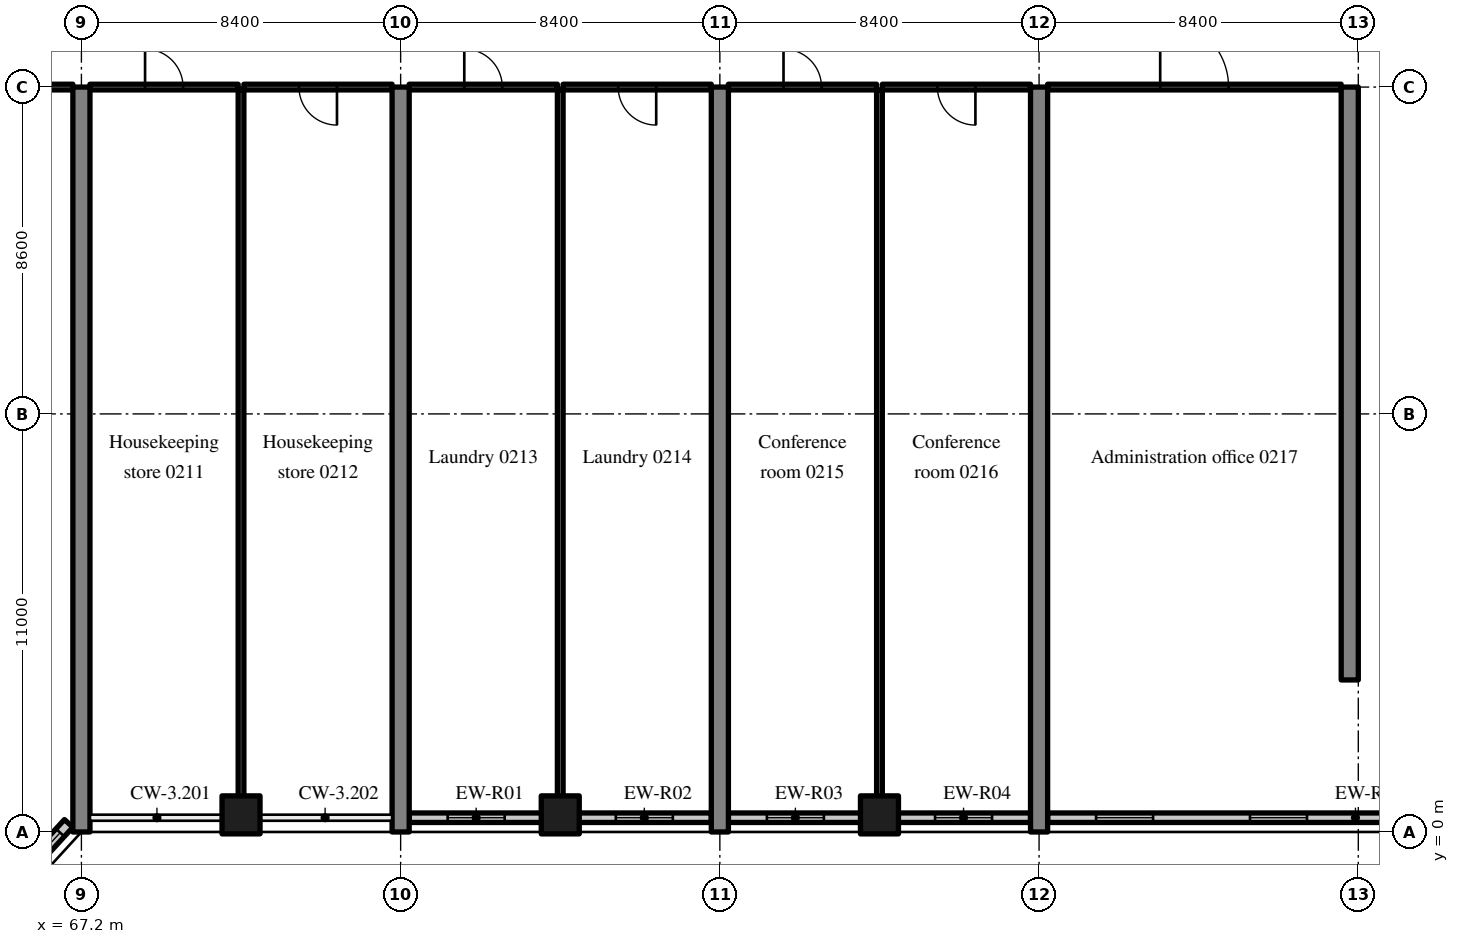
"""IFC4 building model, lengths in metres.
Left out: names, types, materials, properties, quantities, classifications, styles, units other than length and angle.
Written with IfcOpenShell. Run it as: python <this file> out.ifc"""

import sys

from ifc_helpers import new_model, si_unit, direction, frame, frame_2d, origin, origin_2d, place, context, subcontext, project, spatial, rectangle, extrude, source, transform, mapped, element, fill, save


model = new_model("IFC4")
c1 = context("Model", 3, precision=1e-05, world=origin(), true_north=direction((0.0, 1.0)))
c2 = subcontext(c1, "Body", "Model", "MODEL_VIEW")
j1 = project(units=[si_unit("LENGTHUNIT", "METRE"), si_unit("PLANEANGLEUNIT", "RADIAN")], contexts=[c1])
p1 = place(None, origin())
s1 = spatial("IfcSite", under=j1, at=p1, CompositionType="ELEMENT")
p2 = place(p1, origin())
s2 = spatial("IfcBuilding", under=s1, at=p2, CompositionType="ELEMENT")
p3 = place(p2, frame((0.0, 0.0, 11.4)))
s3 = spatial("IfcBuildingStorey", under=s2, at=p3, CompositionType="ELEMENT", Elevation=11.4)
m1 = source(origin(), c2, "Body", "SweptSolid", [
    extrude(rectangle(XDim=19.6, YDim=0.45, at=frame_2d((9.8, 0.0))), origin(), (0.0, 0.0, 1.0), 6.32),
])
for number, where, z_axis, x_axis in (
    (1, (67.2, 0.0, 0.0), (0.0, 0.0, 1.0), (0.0, 1.0, 0.0)),
    (2, (75.6, 0.0, 0.0), (0.0, 0.0, 1.0), (0.0, 1.0, 0.0)),
    (3, (84.0, 0.0, 0.0), (0.0, 0.0, 1.0), (0.0, 1.0, 0.0)),
    (4, (92.4, 0.0, 0.0), (0.0, 0.0, 1.0), (0.0, 1.0, 0.0)),
):
    element("IfcWall", number, at=place(p3, frame(where, z_axis=z_axis, x_axis=x_axis)), inside=s3, PredefinedType="SHEAR", context=c2, shape_type="MappedRepresentation", body=[
        mapped(m1, transform((0.0, 0.0, 0.0), scale=1.0)),
    ])
m2 = source(origin(), c2, "Body", "SweptSolid", [
    extrude(rectangle(XDim=15.6, YDim=0.45, at=frame_2d((7.8, 0.0))), origin(), (0.0, 0.0, 1.0), 6.32),
])
p4 = place(p3, frame((100.575, 4.0, 0.0), z_axis=(0.0, 0.0, 1.0), x_axis=(0.0, 1.0, 0.0)))
e5 = element("IfcWall", 5, at=p4, inside=s3, PredefinedType="SHEAR", context=c2, shape_type="MappedRepresentation", body=[
    mapped(m2, transform((0.0, 0.0, 0.0), scale=1.0)),
])
m3 = source(origin(), c2, "Body", "SweptSolid", [
    extrude(rectangle(XDim=1.0, YDim=1.0, at=origin_2d()), origin(), (0.0, 0.0, 1.0), 6.32),
])
for number, where, z_axis, x_axis in (
    (6, (71.4, 0.45, 0.0), (0.0, 0.0, 1.0), (1.0, 0.0, 0.0)),
    (7, (79.8, 0.45, 0.0), (0.0, 0.0, 1.0), (1.0, 0.0, 0.0)),
    (8, (88.2, 0.45, 0.0), (0.0, 0.0, 1.0), (1.0, 0.0, 0.0)),
):
    element("IfcColumn", number, at=place(p3, frame(where, z_axis=z_axis, x_axis=x_axis)), inside=s3, PredefinedType="COLUMN", context=c2, shape_type="MappedRepresentation", body=[
        mapped(m3, transform((0.0, 0.0, 0.0), scale=1.0)),
    ])
m4 = source(origin(), c2, "Body", "SweptSolid", [
    extrude(rectangle(XDim=2.162, YDim=0.3, at=frame_2d((1.081, 0.0))), origin(), (0.0, 0.0, 1.0), 6.32),
])
p5 = place(p3, frame((65.404, -1.369, 0.0), z_axis=(0.0, 0.0, 1.0), x_axis=(0.67537173084, 0.737477474355, 0.0)))
e9 = element("IfcWall", 9, at=p5, inside=s3, PredefinedType="SOLIDWALL", context=c2, shape_type="MappedRepresentation", body=[
    mapped(m4, transform((0.0, 0.0, 0.0), scale=1.0)),
])
m5 = source(origin(), c2, "Body", "SweptSolid", [
    extrude(rectangle(XDim=1.5, YDim=2.0, at=frame_2d((0.75, 1.0))), frame((0.0, 0.16, 0.0), z_axis=(0.0, -1.0, 0.0), x_axis=(1.0, 0.0, 0.0)), (0.0, 0.0, 1.0), 0.32),
])
p6 = place(p5, frame((0.331, 0.0, 0.9)))
e10 = element("IfcOpeningElement", 10, at=p6, cuts=e9, PredefinedType="OPENING", context=c2, shape_type="MappedRepresentation", body=[
    mapped(m5, transform((0.0, 0.0, 0.0), scale=1.0)),
])
m6 = source(origin(), c2, "Body", "SweptSolid", [
    extrude(rectangle(XDim=3.525, YDim=0.25, at=frame_2d((1.763, 0.0))), origin(), (0.0, 0.0, 1.0), 5.57),
])
p7 = place(p3, frame((75.825, 0.375, 0.0), z_axis=(0.0, 0.0, 1.0), x_axis=(1.0, 0.0, 0.0)))
e11 = element("IfcWall", 11, at=p7, inside=s3, PredefinedType="SOLIDWALL", context=c2, shape_type="MappedRepresentation", body=[
    mapped(m6, transform((0.0, 0.0, 0.0), scale=1.0)),
])
m7 = source(origin(), c2, "Body", "SweptSolid", [
    extrude(rectangle(XDim=1.5, YDim=2.0, at=frame_2d((0.75, 1.0))), frame((0.0, 0.135, 0.0), z_axis=(0.0, -1.0, 0.0), x_axis=(1.0, 0.0, 0.0)), (0.0, 0.0, 1.0), 0.27),
])
p8 = place(p7, frame((1.012, 0.0, 0.9)))
e12 = element("IfcOpeningElement", 12, at=p8, cuts=e11, PredefinedType="OPENING", context=c2, shape_type="MappedRepresentation", body=[
    mapped(m7, transform((0.0, 0.0, 0.0), scale=1.0)),
])
m8 = source(origin(), c2, "Body", "SweptSolid", [
    extrude(rectangle(XDim=3.525, YDim=0.25, at=frame_2d((1.762, 0.0))), origin(), (0.0, 0.0, 1.0), 5.57),
])
p9 = place(p3, frame((80.25, 0.375, 0.0), z_axis=(0.0, 0.0, 1.0), x_axis=(1.0, 0.0, 0.0)))
e13 = element("IfcWall", 13, at=p9, inside=s3, PredefinedType="SOLIDWALL", context=c2, shape_type="MappedRepresentation", body=[
    mapped(m8, transform((0.0, 0.0, 0.0), scale=1.0)),
])
p10 = place(p9, frame((1.012, 0.0, 0.9)))
e14 = element("IfcOpeningElement", 14, at=p10, cuts=e13, PredefinedType="OPENING", context=c2, shape_type="MappedRepresentation", body=[
    mapped(m7, transform((0.0, 0.0, 0.0), scale=1.0)),
])
p11 = place(p3, frame((84.225, 0.375, 0.0), z_axis=(0.0, 0.0, 1.0), x_axis=(1.0, 0.0, 0.0)))
e15 = element("IfcWall", 15, at=p11, inside=s3, PredefinedType="SOLIDWALL", context=c2, shape_type="MappedRepresentation", body=[
    mapped(m8, transform((0.0, 0.0, 0.0), scale=1.0)),
])
p12 = place(p11, frame((1.012, 0.0, 0.9)))
e16 = element("IfcOpeningElement", 16, at=p12, cuts=e15, PredefinedType="OPENING", context=c2, shape_type="MappedRepresentation", body=[
    mapped(m7, transform((0.0, 0.0, 0.0), scale=1.0)),
])
p13 = place(p3, frame((88.65, 0.375, 0.0), z_axis=(0.0, 0.0, 1.0), x_axis=(1.0, 0.0, 0.0)))
e17 = element("IfcWall", 17, at=p13, inside=s3, PredefinedType="SOLIDWALL", context=c2, shape_type="MappedRepresentation", body=[
    mapped(m6, transform((0.0, 0.0, 0.0), scale=1.0)),
])
p14 = place(p13, frame((1.012, 0.0, 0.9)))
e18 = element("IfcOpeningElement", 18, at=p14, cuts=e17, PredefinedType="OPENING", context=c2, shape_type="MappedRepresentation", body=[
    mapped(m7, transform((0.0, 0.0, 0.0), scale=1.0)),
])
m9 = source(origin(), c2, "Body", "SweptSolid", [
    extrude(rectangle(XDim=16.2, YDim=0.25, at=frame_2d((8.1, 0.0))), origin(), (0.0, 0.0, 1.0), 5.57),
])
p15 = place(p3, frame((92.625, 0.375, 0.0), z_axis=(0.0, 0.0, 1.0), x_axis=(1.0, 0.0, 0.0)))
e19 = element("IfcWall", 19, at=p15, inside=s3, PredefinedType="SOLIDWALL", context=c2, shape_type="MappedRepresentation", body=[
    mapped(m9, transform((0.0, 0.0, 0.0), scale=1.0)),
])
p16 = place(p15, frame((1.275, 0.0, 0.9)))
e20 = element("IfcOpeningElement", 20, at=p16, cuts=e19, PredefinedType="OPENING", context=c2, shape_type="MappedRepresentation", body=[
    mapped(m7, transform((0.0, 0.0, 0.0), scale=1.0)),
])
p17 = place(p15, frame((5.325, 0.0, 0.9)))
e21 = element("IfcOpeningElement", 21, at=p17, cuts=e19, PredefinedType="OPENING", context=c2, shape_type="MappedRepresentation", body=[
    mapped(m7, transform((0.0, 0.0, 0.0), scale=1.0)),
])
p18 = place(p15, frame((9.375, 0.0, 0.9)))
e22 = element("IfcOpeningElement", 22, at=p18, cuts=e19, PredefinedType="OPENING", context=c2, shape_type="MappedRepresentation", body=[
    mapped(m7, transform((0.0, 0.0, 0.0), scale=1.0)),
])
p19 = place(p15, frame((13.425, 0.0, 0.9)))
e23 = element("IfcOpeningElement", 23, at=p19, cuts=e19, PredefinedType="OPENING", context=c2, shape_type="MappedRepresentation", body=[
    mapped(m7, transform((0.0, 0.0, 0.0), scale=1.0)),
])
m10 = source(origin(), c2, "Body", "SweptSolid", [
    extrude(rectangle(XDim=7.95, YDim=0.15, at=frame_2d((3.975, 0.0))), origin(), (0.0, 0.0, 1.0), 5.62),
])
p20 = place(p3, frame((59.025, 19.6, 0.0), z_axis=(0.0, 0.0, 1.0), x_axis=(1.0, 0.0, 0.0)))
e24 = element("IfcWall", 24, at=p20, inside=s3, PredefinedType="PARTITIONING", context=c2, shape_type="MappedRepresentation", body=[
    mapped(m10, transform((0.0, 0.0, 0.0), scale=1.0)),
])
m11 = source(origin(), c2, "Body", "SweptSolid", [
    extrude(rectangle(XDim=1.8, YDim=2.1, at=frame_2d((0.9, 1.05))), frame((0.0, 0.085, 0.0), z_axis=(0.0, -1.0, 0.0), x_axis=(1.0, 0.0, 0.0)), (0.0, 0.0, 1.0), 0.17),
])
p21 = place(p20, frame((3.075, 0.0, 0.0)))
e25 = element("IfcOpeningElement", 25, at=p21, cuts=e24, PredefinedType="OPENING", context=c2, shape_type="MappedRepresentation", body=[
    mapped(m11, transform((0.0, 0.0, 0.0), scale=1.0)),
])
m12 = source(origin(), c2, "Body", "SweptSolid", [
    extrude(rectangle(XDim=3.9, YDim=0.15, at=frame_2d((1.95, 0.0))), origin(), (0.0, 0.0, 1.0), 5.62),
])
p22 = place(p3, frame((67.425, 19.6, 0.0), z_axis=(0.0, 0.0, 1.0), x_axis=(1.0, 0.0, 0.0)))
e26 = element("IfcWall", 26, at=p22, inside=s3, PredefinedType="PARTITIONING", context=c2, shape_type="MappedRepresentation", body=[
    mapped(m12, transform((0.0, 0.0, 0.0), scale=1.0)),
])
m13 = source(origin(), c2, "Body", "SweptSolid", [
    extrude(rectangle(XDim=1.0, YDim=2.1, at=frame_2d((0.5, 1.05))), frame((0.0, 0.085, 0.0), z_axis=(0.0, -1.0, 0.0), x_axis=(1.0, 0.0, 0.0)), (0.0, 0.0, 1.0), 0.17),
])
p23 = place(p22, frame((1.45, 0.0, 0.0)))
e27 = element("IfcOpeningElement", 27, at=p23, cuts=e26, PredefinedType="OPENING", context=c2, shape_type="MappedRepresentation", body=[
    mapped(m13, transform((0.0, 0.0, 0.0), scale=1.0)),
])
p24 = place(p3, frame((71.475, 19.6, 0.0), z_axis=(0.0, 0.0, 1.0), x_axis=(1.0, 0.0, 0.0)))
e28 = element("IfcWall", 28, at=p24, inside=s3, PredefinedType="PARTITIONING", context=c2, shape_type="MappedRepresentation", body=[
    mapped(m12, transform((0.0, 0.0, 0.0), scale=1.0)),
])
p25 = place(p24, frame((1.45, 0.0, 0.0)))
e29 = element("IfcOpeningElement", 29, at=p25, cuts=e28, PredefinedType="OPENING", context=c2, shape_type="MappedRepresentation", body=[
    mapped(m13, transform((0.0, 0.0, 0.0), scale=1.0)),
])
m14 = source(origin(), c2, "Body", "SweptSolid", [
    extrude(rectangle(XDim=18.625, YDim=0.15, at=frame_2d((9.312, 0.0))), origin(), (0.0, 0.0, 1.0), 6.32),
])
p26 = place(p3, frame((71.4, 0.9, 0.0), z_axis=(0.0, 0.0, 1.0), x_axis=(0.0, 1.0, 0.0)))
e30 = element("IfcWall", 30, at=p26, inside=s3, PredefinedType="PARTITIONING", context=c2, shape_type="MappedRepresentation", body=[
    mapped(m14, transform((0.0, 0.0, 0.0), scale=1.0)),
])
m15 = source(origin(), c2, "Body", "SweptSolid", [
    extrude(rectangle(XDim=3.9, YDim=0.15, at=frame_2d((1.95, 0.0))), origin(), (0.0, 0.0, 1.0), 5.62),
])
p27 = place(p3, frame((75.825, 19.6, 0.0), z_axis=(0.0, 0.0, 1.0), x_axis=(1.0, 0.0, 0.0)))
e31 = element("IfcWall", 31, at=p27, inside=s3, PredefinedType="PARTITIONING", context=c2, shape_type="MappedRepresentation", body=[
    mapped(m15, transform((0.0, 0.0, 0.0), scale=1.0)),
])
p28 = place(p27, frame((1.45, 0.0, 0.0)))
e32 = element("IfcOpeningElement", 32, at=p28, cuts=e31, PredefinedType="OPENING", context=c2, shape_type="MappedRepresentation", body=[
    mapped(m13, transform((0.0, 0.0, 0.0), scale=1.0)),
])
p29 = place(p3, frame((79.875, 19.6, 0.0), z_axis=(0.0, 0.0, 1.0), x_axis=(1.0, 0.0, 0.0)))
e33 = element("IfcWall", 33, at=p29, inside=s3, PredefinedType="PARTITIONING", context=c2, shape_type="MappedRepresentation", body=[
    mapped(m12, transform((0.0, 0.0, 0.0), scale=1.0)),
])
p30 = place(p29, frame((1.45, 0.0, 0.0)))
e34 = element("IfcOpeningElement", 34, at=p30, cuts=e33, PredefinedType="OPENING", context=c2, shape_type="MappedRepresentation", body=[
    mapped(m13, transform((0.0, 0.0, 0.0), scale=1.0)),
])
p31 = place(p3, frame((79.8, 0.9, 0.0), z_axis=(0.0, 0.0, 1.0), x_axis=(0.0, 1.0, 0.0)))
e35 = element("IfcWall", 35, at=p31, inside=s3, PredefinedType="PARTITIONING", context=c2, shape_type="MappedRepresentation", body=[
    mapped(m14, transform((0.0, 0.0, 0.0), scale=1.0)),
])
p32 = place(p3, frame((84.225, 19.6, 0.0), z_axis=(0.0, 0.0, 1.0), x_axis=(1.0, 0.0, 0.0)))
e36 = element("IfcWall", 36, at=p32, inside=s3, PredefinedType="PARTITIONING", context=c2, shape_type="MappedRepresentation", body=[
    mapped(m12, transform((0.0, 0.0, 0.0), scale=1.0)),
])
p33 = place(p32, frame((1.45, 0.0, 0.0)))
e37 = element("IfcOpeningElement", 37, at=p33, cuts=e36, PredefinedType="OPENING", context=c2, shape_type="MappedRepresentation", body=[
    mapped(m13, transform((0.0, 0.0, 0.0), scale=1.0)),
])
p34 = place(p3, frame((88.275, 19.6, 0.0), z_axis=(0.0, 0.0, 1.0), x_axis=(1.0, 0.0, 0.0)))
e38 = element("IfcWall", 38, at=p34, inside=s3, PredefinedType="PARTITIONING", context=c2, shape_type="MappedRepresentation", body=[
    mapped(m15, transform((0.0, 0.0, 0.0), scale=1.0)),
])
p35 = place(p34, frame((1.45, 0.0, 0.0)))
e39 = element("IfcOpeningElement", 39, at=p35, cuts=e38, PredefinedType="OPENING", context=c2, shape_type="MappedRepresentation", body=[
    mapped(m13, transform((0.0, 0.0, 0.0), scale=1.0)),
])
p36 = place(p3, frame((88.2, 0.9, 0.0), z_axis=(0.0, 0.0, 1.0), x_axis=(0.0, 1.0, 0.0)))
e40 = element("IfcWall", 40, at=p36, inside=s3, PredefinedType="PARTITIONING", context=c2, shape_type="MappedRepresentation", body=[
    mapped(m14, transform((0.0, 0.0, 0.0), scale=1.0)),
])
m16 = source(origin(), c2, "Body", "SweptSolid", [
    extrude(rectangle(XDim=7.725, YDim=0.15, at=frame_2d((3.863, 0.0))), origin(), (0.0, 0.0, 1.0), 5.62),
])
p37 = place(p3, frame((92.625, 19.6, 0.0), z_axis=(0.0, 0.0, 1.0), x_axis=(1.0, 0.0, 0.0)))
e41 = element("IfcWall", 41, at=p37, inside=s3, PredefinedType="PARTITIONING", context=c2, shape_type="MappedRepresentation", body=[
    mapped(m16, transform((0.0, 0.0, 0.0), scale=1.0)),
])
p38 = place(p37, frame((2.962, 0.0, 0.0)))
e42 = element("IfcOpeningElement", 42, at=p38, cuts=e41, PredefinedType="OPENING", context=c2, shape_type="MappedRepresentation", body=[
    mapped(m11, transform((0.0, 0.0, 0.0), scale=1.0)),
])
m17 = source(origin(), c2, "Body", "SweptSolid", [
    extrude(rectangle(XDim=1.5, YDim=2.0, at=frame_2d((0.75, 1.0))), frame((0.0, 0.03, 0.0), z_axis=(0.0, -1.0, 0.0), x_axis=(1.0, 0.0, 0.0)), (0.0, 0.0, 1.0), 0.06),
])
p39 = place(p6, origin())
e43 = element("IfcWindow", 43, at=p39, inside=s3, PartitioningType="SINGLE_PANEL", PredefinedType="WINDOW", context=c2, shape_type="MappedRepresentation", body=[
    mapped(m17, transform((0.0, 0.0, 0.0), scale=1.0)),
])
fill(e10, e43)
p40 = place(p8, origin())
e44 = element("IfcWindow", 44, at=p40, inside=s3, PartitioningType="SINGLE_PANEL", PredefinedType="WINDOW", context=c2, shape_type="MappedRepresentation", body=[
    mapped(m17, transform((0.0, 0.0, 0.0), scale=1.0)),
])
fill(e12, e44)
p41 = place(p10, origin())
e45 = element("IfcWindow", 45, at=p41, inside=s3, PartitioningType="SINGLE_PANEL", PredefinedType="WINDOW", context=c2, shape_type="MappedRepresentation", body=[
    mapped(m17, transform((0.0, 0.0, 0.0), scale=1.0)),
])
fill(e14, e45)
p42 = place(p12, origin())
e46 = element("IfcWindow", 46, at=p42, inside=s3, PartitioningType="SINGLE_PANEL", PredefinedType="WINDOW", context=c2, shape_type="MappedRepresentation", body=[
    mapped(m17, transform((0.0, 0.0, 0.0), scale=1.0)),
])
fill(e16, e46)
p43 = place(p14, origin())
e47 = element("IfcWindow", 47, at=p43, inside=s3, PartitioningType="SINGLE_PANEL", PredefinedType="WINDOW", context=c2, shape_type="MappedRepresentation", body=[
    mapped(m17, transform((0.0, 0.0, 0.0), scale=1.0)),
])
fill(e18, e47)
p44 = place(p16, origin())
e48 = element("IfcWindow", 48, at=p44, inside=s3, PartitioningType="SINGLE_PANEL", PredefinedType="WINDOW", context=c2, shape_type="MappedRepresentation", body=[
    mapped(m17, transform((0.0, 0.0, 0.0), scale=1.0)),
])
fill(e20, e48)
p45 = place(p17, origin())
e49 = element("IfcWindow", 49, at=p45, inside=s3, PartitioningType="SINGLE_PANEL", PredefinedType="WINDOW", context=c2, shape_type="MappedRepresentation", body=[
    mapped(m17, transform((0.0, 0.0, 0.0), scale=1.0)),
])
fill(e21, e49)
m18 = source(origin(), c2, "Body", "SweptSolid", [
    extrude(rectangle(XDim=1.0, YDim=2.1, at=frame_2d((0.5, 1.05))), frame((0.0, 0.025, 0.0), z_axis=(0.0, -1.0, 0.0), x_axis=(1.0, 0.0, 0.0)), (0.0, 0.0, 1.0), 0.05),
])
p46 = place(p23, origin())
e50 = element("IfcDoor", 50, at=p46, inside=s3, OperationType="SINGLE_SWING_LEFT", PredefinedType="DOOR", context=c2, shape_type="MappedRepresentation", body=[
    mapped(m18, transform((0.0, 0.0, 0.0), scale=1.0)),
])
fill(e27, e50)
p47 = place(p25, origin())
e51 = element("IfcDoor", 51, at=p47, inside=s3, OperationType="SINGLE_SWING_RIGHT", PredefinedType="DOOR", context=c2, shape_type="MappedRepresentation", body=[
    mapped(m18, transform((0.0, 0.0, 0.0), scale=1.0)),
])
fill(e29, e51)
p48 = place(p28, origin())
e52 = element("IfcDoor", 52, at=p48, inside=s3, OperationType="SINGLE_SWING_LEFT", PredefinedType="DOOR", context=c2, shape_type="MappedRepresentation", body=[
    mapped(m18, transform((0.0, 0.0, 0.0), scale=1.0)),
])
fill(e32, e52)
p49 = place(p30, origin())
e53 = element("IfcDoor", 53, at=p49, inside=s3, OperationType="SINGLE_SWING_RIGHT", PredefinedType="DOOR", context=c2, shape_type="MappedRepresentation", body=[
    mapped(m18, transform((0.0, 0.0, 0.0), scale=1.0)),
])
fill(e34, e53)
p50 = place(p33, origin())
e54 = element("IfcDoor", 54, at=p50, inside=s3, OperationType="SINGLE_SWING_LEFT", PredefinedType="DOOR", context=c2, shape_type="MappedRepresentation", body=[
    mapped(m18, transform((0.0, 0.0, 0.0), scale=1.0)),
])
fill(e37, e54)
p51 = place(p35, origin())
e55 = element("IfcDoor", 55, at=p51, inside=s3, OperationType="SINGLE_SWING_RIGHT", PredefinedType="DOOR", context=c2, shape_type="MappedRepresentation", body=[
    mapped(m18, transform((0.0, 0.0, 0.0), scale=1.0)),
])
fill(e39, e55)
m19 = source(origin(), c2, "Body", "SweptSolid", [
    extrude(rectangle(XDim=1.8, YDim=2.1, at=frame_2d((0.9, 1.05))), frame((0.0, 0.025, 0.0), z_axis=(0.0, -1.0, 0.0), x_axis=(1.0, 0.0, 0.0)), (0.0, 0.0, 1.0), 0.05),
])
p52 = place(p38, origin())
e56 = element("IfcDoor", 56, at=p52, inside=s3, OperationType="DOUBLE_DOOR_SINGLE_SWING", PredefinedType="DOOR", context=c2, shape_type="MappedRepresentation", body=[
    mapped(m19, transform((0.0, 0.0, 0.0), scale=1.0)),
])
fill(e42, e56)
save(model, sys.argv[1])
